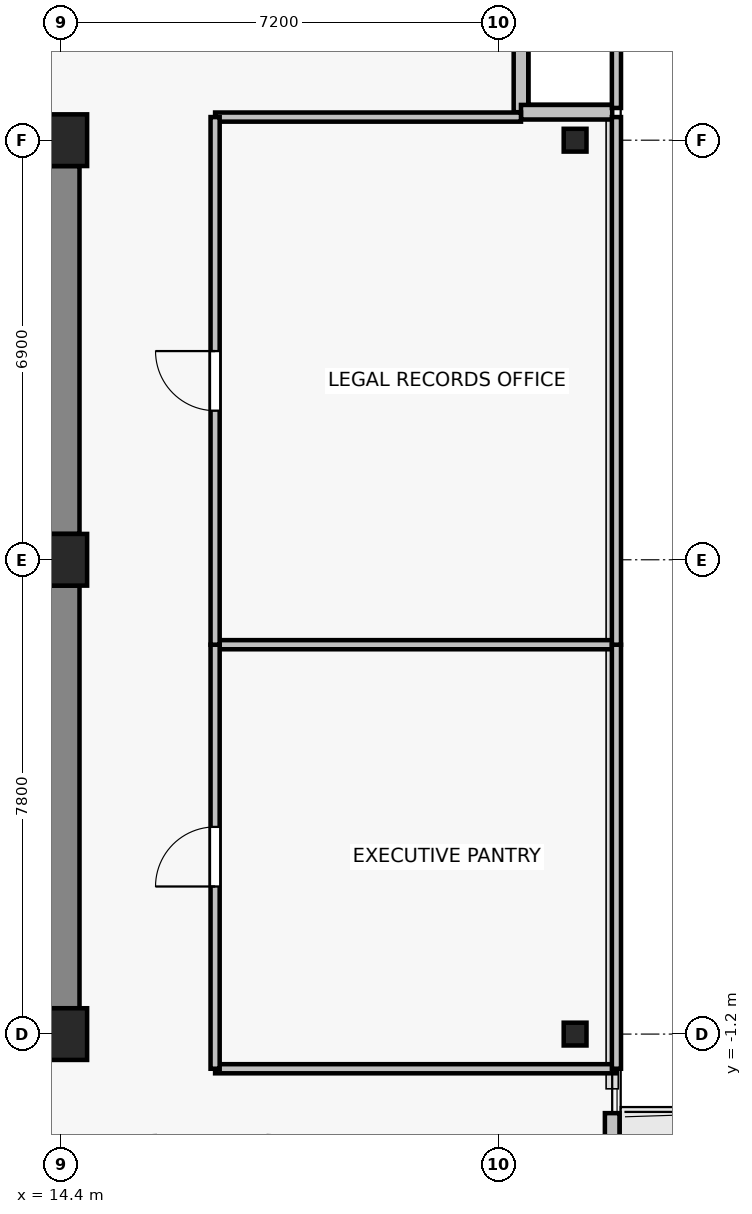
"""IFC4 building model, lengths in metres.
Left out: names, types, materials, properties, quantities, classifications, styles, units other than length and angle.
Written with IfcOpenShell. Run it as: python <this file> out.ifc"""

import sys

from ifc_helpers import new_model, si_unit, direction, frame, frame_2d, origin, origin_2d, place, context, subcontext, project, spatial, rectangle, i_section, extrude, source, transform, mapped, element, fill, save


model = new_model("IFC4")
c1 = context("Model", 3, precision=1e-05, world=origin(), true_north=direction((0.0, 1.0)))
c2 = subcontext(c1, "Body", "Model", "MODEL_VIEW")
j1 = project(units=[si_unit("LENGTHUNIT", "METRE"), si_unit("PLANEANGLEUNIT", "RADIAN")], contexts=[c1])
p1 = place(None, origin())
s1 = spatial("IfcSite", under=j1, at=p1, CompositionType="ELEMENT")
p2 = place(p1, origin())
s2 = spatial("IfcBuilding", under=s1, at=p2, CompositionType="ELEMENT")
p3 = place(p2, frame((0.0, 0.0, 251.8)))
s3 = spatial("IfcBuildingStorey", under=s2, at=p3, CompositionType="ELEMENT", Elevation=251.8)
for number, where, z_axis, x_axis in (
    (1, (14.4, -1.2, 0.0), (0.0, 0.0, 1.0), (1.0, 0.0, 0.0)),
    (2, (14.4, 6.6, 0.0), (0.0, 0.0, 1.0), (1.0, 0.0, 0.0)),
    (3, (14.4, 13.5, 0.0), (0.0, 0.0, 1.0), (1.0, 0.0, 0.0)),
):
    element("IfcColumn", number, at=place(p3, frame(where, z_axis=z_axis, x_axis=x_axis)), inside=s3, PredefinedType="COLUMN", context=c2, shape_type="SweptSolid", body=[
        extrude(rectangle(XDim=0.85, YDim=0.85, at=origin_2d()), origin(), (0.0, 0.0, 1.0), 3.3),
    ])
for number, where, z_axis, x_axis in (
    (4, (22.85, -1.2, 0.0), (0.0, 0.0, 1.0), (1.0, 0.0, 0.0)),
    (5, (22.85, 13.5, 0.0), (0.0, 0.0, 1.0), (1.0, 0.0, 0.0)),
):
    element("IfcColumn", number, at=place(p3, frame(where, z_axis=z_axis, x_axis=x_axis)), inside=s3, PredefinedType="COLUMN", context=c2, shape_type="SweptSolid", body=[
        extrude(i_section(OverallWidth=0.375, OverallDepth=0.375, WebThickness=0.017, FlangeThickness=0.027, FilletRadius=0.015, at=origin_2d()), origin(), (0.0, 0.0, 1.0), 3.3),
    ])
p4 = place(p3, frame((14.4, -0.775, 0.0), z_axis=(0.0, 0.0, 1.0), x_axis=(0.0, 1.0, 0.0)))
e6 = element("IfcWall", 6, at=p4, inside=s3, PredefinedType="SHEAR", context=c2, shape_type="SweptSolid", body=[
    extrude(rectangle(XDim=6.95, YDim=0.6, at=frame_2d((3.475, 0.0))), origin(), (0.0, 0.0, 1.0), 3.075),
])
p5 = place(p3, frame((14.4, 7.025, 0.0), z_axis=(0.0, 0.0, 1.0), x_axis=(0.0, 1.0, 0.0)))
e7 = element("IfcWall", 7, at=p5, inside=s3, PredefinedType="SHEAR", context=c2, shape_type="SweptSolid", body=[
    extrude(rectangle(XDim=6.05, YDim=0.6, at=frame_2d((3.025, 0.0))), origin(), (0.0, 0.0, 1.0), 3.075),
])
p6 = place(p3, frame((23.46, -2.5, 0.0), z_axis=(0.0, 0.0, 1.0), x_axis=(0.0, -1.0, 0.0)))
e8 = element("IfcWall", 8, at=p6, inside=s3, PredefinedType="SOLIDWALL", context=c2, shape_type="SweptSolid", body=[
    extrude(rectangle(XDim=5.8, YDim=0.24, at=frame_2d((2.9, 0.0))), origin(), (0.0, 0.0, 1.0), 3.075),
])
p7 = place(p6, frame((1.566, 0.0, 0.0)))
e9 = element("IfcOpeningElement", 9, at=p7, cuts=e8, PredefinedType="OPENING", context=c2, shape_type="SweptSolid", body=[
    extrude(rectangle(XDim=1.0, YDim=2.2, at=frame_2d((0.5, 1.1))), frame((0.0, 0.13, 0.0), z_axis=(0.0, -1.0, 0.0), x_axis=(1.0, 0.0, 0.0)), (0.0, 0.0, 1.0), 0.26),
])
p8 = place(p6, frame((2.916, 0.0, 0.85)))
e10 = element("IfcOpeningElement", 10, at=p8, cuts=e8, PredefinedType="OPENING", context=c2, shape_type="SweptSolid", body=[
    extrude(rectangle(XDim=0.9, YDim=1.35, at=frame_2d((0.45, 0.675))), frame((0.0, 0.13, 0.0), z_axis=(0.0, -1.0, 0.0), x_axis=(1.0, 0.0, 0.0)), (0.0, 0.0, 1.0), 0.26),
])
for number, where, z_axis, x_axis in (
    (11, (21.96, 13.96, 0.0), (0.0, 0.0, 1.0), (0.0, 1.0, 0.0)),
    (12, (23.46, 13.96, 0.0), (0.0, 0.0, 1.0), (-1.0, 0.0, 0.0)),
):
    element("IfcWall", number, at=place(p3, frame(where, z_axis=z_axis, x_axis=x_axis)), inside=s3, PredefinedType="SOLIDWALL", context=c2, shape_type="SweptSolid", body=[
        extrude(rectangle(XDim=1.5, YDim=0.24, at=frame_2d((0.75, 0.0))), origin(), (0.0, 0.0, 1.0), 3.075),
    ])
for number, where, z_axis, x_axis in (
    (13, (23.53, -1.77, 0.0), (0.0, 0.0, 1.0), (-1.0, 0.0, 0.0)),
    (14, (16.93, 5.203, 0.0), (0.0, 0.0, 1.0), (1.0, 0.0, 0.0)),
):
    element("IfcWall", number, at=place(p3, frame(where, z_axis=z_axis, x_axis=x_axis)), inside=s3, PredefinedType="PARTITIONING", context=c2, shape_type="SweptSolid", body=[
        extrude(rectangle(XDim=6.6, YDim=0.15, at=frame_2d((3.3, 0.0))), origin(), (0.0, 0.0, 1.0), 2.765),
    ])
p9 = place(p3, frame((16.93, -1.77, 0.0), z_axis=(0.0, 0.0, 1.0), x_axis=(0.0, 1.0, 0.0)))
e15 = element("IfcWall", 15, at=p9, inside=s3, PredefinedType="PARTITIONING", context=c2, shape_type="SweptSolid", body=[
    extrude(rectangle(XDim=6.973, YDim=0.15, at=frame_2d((3.487, 0.0))), origin(), (0.0, 0.0, 1.0), 2.615),
])
p10 = place(p9, frame((2.997, 0.0, 0.0)))
e16 = element("IfcOpeningElement", 16, at=p10, cuts=e15, PredefinedType="OPENING", context=c2, shape_type="SweptSolid", body=[
    extrude(rectangle(XDim=0.98, YDim=2.15, at=frame_2d((0.49, 1.075))), frame((0.0, 0.085, 0.0), z_axis=(0.0, -1.0, 0.0), x_axis=(1.0, 0.0, 0.0)), (0.0, 0.0, 1.0), 0.17),
])
p11 = place(p3, frame((23.53, 5.203, 0.0), z_axis=(0.0, 0.0, 1.0), x_axis=(0.0, -1.0, 0.0)))
e17 = element("IfcWall", 17, at=p11, inside=s3, PredefinedType="PARTITIONING", context=c2, shape_type="SweptSolid", body=[
    extrude(rectangle(XDim=6.973, YDim=0.15, at=frame_2d((3.487, 0.0))), origin(), (0.0, 0.0, 1.0), 3.075),
])
p12 = place(p3, frame((16.93, 13.88, 0.0), z_axis=(0.0, 0.0, 1.0), x_axis=(1.0, 0.0, 0.0)))
e18 = element("IfcWall", 18, at=p12, inside=s3, PredefinedType="PARTITIONING", context=c2, shape_type="SweptSolid", body=[
    extrude(rectangle(XDim=5.03, YDim=0.15, at=frame_2d((2.515, 0.0))), origin(), (0.0, 0.0, 1.0), 3.075),
])
p13 = place(p3, frame((16.93, 5.203, 0.0), z_axis=(0.0, 0.0, 1.0), x_axis=(0.0, 1.0, 0.0)))
e19 = element("IfcWall", 19, at=p13, inside=s3, PredefinedType="PARTITIONING", context=c2, shape_type="SweptSolid", body=[
    extrude(rectangle(XDim=8.677, YDim=0.15, at=frame_2d((4.338, 0.0))), origin(), (0.0, 0.0, 1.0), 2.615),
])
p14 = place(p13, frame((3.849, 0.0, 0.0)))
e20 = element("IfcOpeningElement", 20, at=p14, cuts=e19, PredefinedType="OPENING", context=c2, shape_type="SweptSolid", body=[
    extrude(rectangle(XDim=0.98, YDim=2.15, at=frame_2d((0.49, 1.075))), frame((0.0, 0.085, 0.0), z_axis=(0.0, -1.0, 0.0), x_axis=(1.0, 0.0, 0.0)), (0.0, 0.0, 1.0), 0.17),
])
p15 = place(p3, frame((23.53, 13.88, 0.0), z_axis=(0.0, 0.0, 1.0), x_axis=(0.0, -1.0, 0.0)))
e21 = element("IfcWall", 21, at=p15, inside=s3, PredefinedType="PARTITIONING", context=c2, shape_type="SweptSolid", body=[
    extrude(rectangle(XDim=8.677, YDim=0.15, at=frame_2d((4.338, 0.0))), origin(), (0.0, 0.0, 1.0), 3.075),
])
p16 = place(p3, frame((23.53, 17.03, 0.0), z_axis=(0.0, 0.0, 1.0), x_axis=(0.0, -1.0, 0.0)))
e22 = element("IfcWall", 22, at=p16, inside=s3, PredefinedType="PARTITIONING", context=c2, shape_type="SweptSolid", body=[
    extrude(rectangle(XDim=3.0, YDim=0.15, at=frame_2d((1.5, 0.0))), origin(), (0.0, 0.0, 1.0), 3.075),
])
m1 = source(origin(), c2, "Body", "SweptSolid", [
    extrude(rectangle(XDim=0.98, YDim=2.15, at=frame_2d((0.49, 1.075))), frame((0.0, 0.025, 0.0), z_axis=(0.0, -1.0, 0.0), x_axis=(1.0, 0.0, 0.0)), (0.0, 0.0, 1.0), 0.05),
])
p17 = place(p10, origin())
e23 = element("IfcDoor", 23, at=p17, inside=s3, OperationType="SINGLE_SWING_LEFT", PredefinedType="DOOR", context=c2, shape_type="MappedRepresentation", body=[
    mapped(m1, transform((0.0, 0.0, 0.0), x_axis=(1.0, 0.0, 0.0), y_axis=(0.0, 1.0, 0.0), z_axis=(0.0, 0.0, 1.0), scale=1.0)),
])
fill(e16, e23)
p18 = place(p14, origin())
e24 = element("IfcDoor", 24, at=p18, inside=s3, OperationType="SINGLE_SWING_RIGHT", PredefinedType="DOOR", context=c2, shape_type="MappedRepresentation", body=[
    mapped(m1, transform((0.0, 0.0, 0.0), x_axis=(1.0, 0.0, 0.0), y_axis=(0.0, 1.0, 0.0), z_axis=(0.0, 0.0, 1.0), scale=1.0)),
])
fill(e20, e24)
save(model, sys.argv[1])
